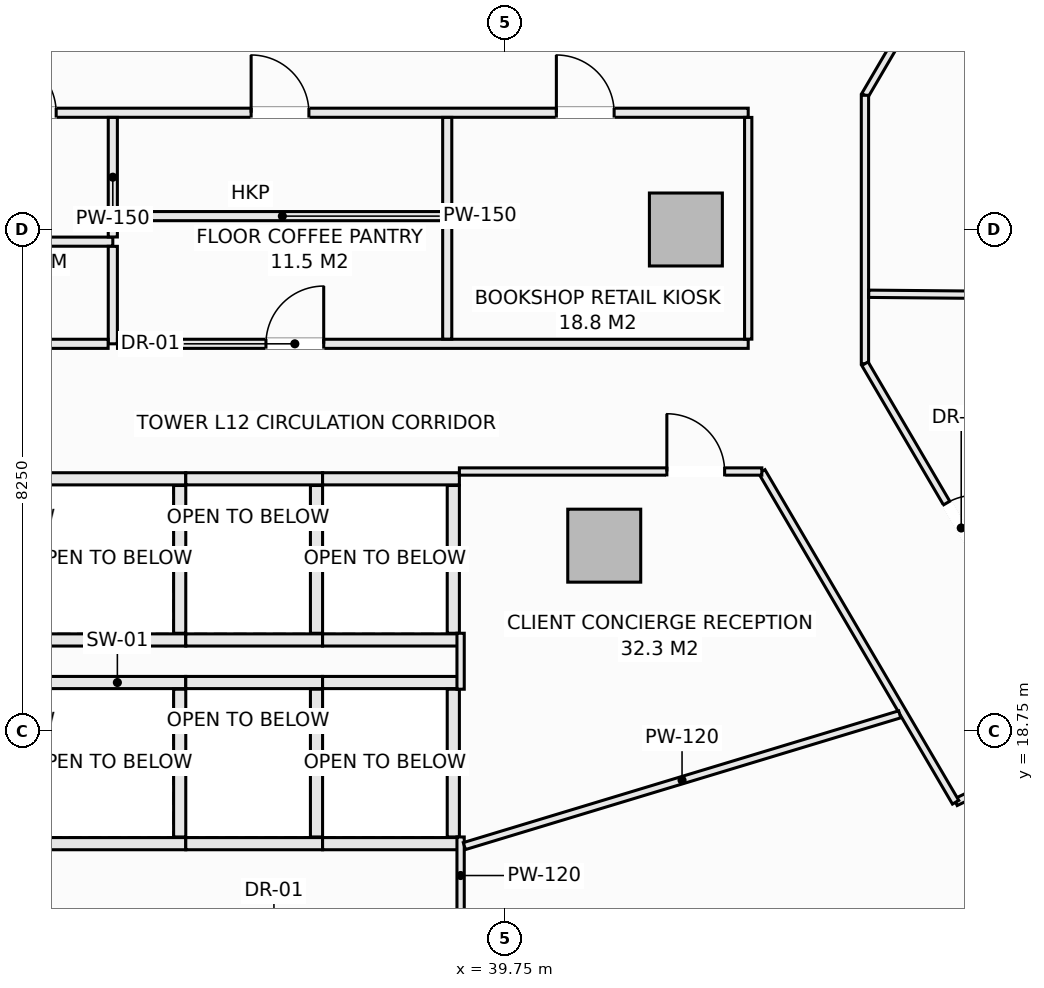
"""IFC4 building model, lengths in metres.
Left out: names, types, materials, properties, quantities, classifications, styles, units other than length and angle.
Written with IfcOpenShell. Run it as: python <this file> out.ifc"""

import sys

from ifc_helpers import new_model, si_unit, direction, frame, frame_2d, origin, origin_2d, place, context, subcontext, project, spatial, rectangle, extrude, element, fill, save


model = new_model("IFC4")
c1 = context("Model", 3, precision=1e-05, world=origin(), true_north=direction((0.0, 1.0)))
c2 = subcontext(c1, "Body", "Model", "MODEL_VIEW")
j1 = project(units=[si_unit("LENGTHUNIT", "METRE"), si_unit("PLANEANGLEUNIT", "RADIAN")], contexts=[c1])
p1 = place(None, origin())
s1 = spatial("IfcSite", under=j1, at=p1, CompositionType="ELEMENT")
p2 = place(p1, origin())
s2 = spatial("IfcBuilding", under=s1, at=p2, CompositionType="ELEMENT")
p3 = place(p2, frame((0.0, 0.0, 53.45)))
s3 = spatial("IfcBuildingStorey", under=s2, at=p3, CompositionType="ELEMENT", Elevation=53.45)
for number, where, z_axis, x_axis in (
    (1, (42.725, 27.0, -0.28), (0.0, 0.0, 1.0), (1.0, 0.0, 0.0)),
    (2, (41.382, 21.801, -0.28), (0.0, 0.0, 1.0), (1.0, 0.0, 0.0)),
):
    element("IfcColumn", number, at=place(p3, frame(where, z_axis=z_axis, x_axis=x_axis)), inside=s3, PredefinedType="COLUMN", context=c2, shape_type="SweptSolid", body=[
        extrude(rectangle(XDim=1.2, YDim=1.2, at=origin_2d()), origin(), (0.0, 0.0, 1.0), 3.85),
    ])
p4 = place(p3, frame((47.224, 13.64, 0.0), z_axis=(0.0, 0.0, 1.0), x_axis=(0.901354747727, 0.433081538224, 0.0)))
e3 = element("IfcWall", 3, at=p4, inside=s3, PredefinedType="SOLIDWALL", context=c2, shape_type="SweptSolid", body=[
    extrude(rectangle(XDim=6.431, YDim=0.3, at=frame_2d((3.215, 0.0))), origin(), (0.0, 0.0, 1.0), 3.093),
])
p5 = place(p4, frame((2.015, 0.0, 0.85)))
e4 = element("IfcOpeningElement", 4, at=p5, cuts=e3, PredefinedType="OPENING", context=c2, shape_type="SweptSolid", body=[
    extrude(rectangle(XDim=2.4, YDim=1.9, at=frame_2d((1.2, 0.95))), frame((0.0, 0.16, 0.0), z_axis=(0.0, -1.0, 0.0), x_axis=(1.0, 0.0, 0.0)), (0.0, 0.0, 1.0), 0.32),
])
for number, where, z_axis, x_axis in (
    (5, (32.25, 19.55, 0.0), (0.0, 0.0, 1.0), (1.0, 0.0, 0.0)),
    (6, (32.25, 16.9, 0.0), (0.0, 0.0, 1.0), (1.0, 0.0, 0.0)),
):
    element("IfcWall", number, at=place(p3, frame(where, z_axis=z_axis, x_axis=x_axis)), inside=s3, PredefinedType="SOLIDWALL", context=c2, shape_type="SweptSolid", body=[
        extrude(rectangle(XDim=2.25, YDim=0.2, at=frame_2d((1.125, 0.0))), origin(), (0.0, 0.0, 1.0), 3.57),
    ])
p6 = place(p3, frame((34.4, 17.01, 0.0), z_axis=(0.0, 0.0, 1.0), x_axis=(0.0, 1.0, 0.0)))
e7 = element("IfcWall", 7, at=p6, inside=s3, PredefinedType="SOLIDWALL", context=c2, shape_type="SweptSolid", body=[
    extrude(rectangle(XDim=2.43, YDim=0.2, at=frame_2d((1.215, 0.0))), origin(), (0.0, 0.0, 1.0), 3.57),
])
for number, where, z_axis, x_axis in (
    (8, (34.5, 19.55, 0.0), (0.0, 0.0, 1.0), (1.0, 0.0, 0.0)),
    (9, (34.5, 16.9, 0.0), (0.0, 0.0, 1.0), (1.0, 0.0, 0.0)),
):
    element("IfcWall", number, at=place(p3, frame(where, z_axis=z_axis, x_axis=x_axis)), inside=s3, PredefinedType="SOLIDWALL", context=c2, shape_type="SweptSolid", body=[
        extrude(rectangle(XDim=2.25, YDim=0.2, at=frame_2d((1.125, 0.0))), origin(), (0.0, 0.0, 1.0), 3.57),
    ])
p7 = place(p3, frame((36.65, 17.01, 0.0), z_axis=(0.0, 0.0, 1.0), x_axis=(0.0, 1.0, 0.0)))
e10 = element("IfcWall", 10, at=p7, inside=s3, PredefinedType="SOLIDWALL", context=c2, shape_type="SweptSolid", body=[
    extrude(rectangle(XDim=2.43, YDim=0.2, at=frame_2d((1.215, 0.0))), origin(), (0.0, 0.0, 1.0), 3.57),
])
for number, where, z_axis, x_axis in (
    (11, (36.75, 19.55, 0.0), (0.0, 0.0, 1.0), (1.0, 0.0, 0.0)),
    (12, (36.75, 16.9, 0.0), (0.0, 0.0, 1.0), (1.0, 0.0, 0.0)),
):
    element("IfcWall", number, at=place(p3, frame(where, z_axis=z_axis, x_axis=x_axis)), inside=s3, PredefinedType="SOLIDWALL", context=c2, shape_type="SweptSolid", body=[
        extrude(rectangle(XDim=2.25, YDim=0.2, at=frame_2d((1.125, 0.0))), origin(), (0.0, 0.0, 1.0), 3.57),
    ])
p8 = place(p3, frame((38.9, 17.01, 0.0), z_axis=(0.0, 0.0, 1.0), x_axis=(0.0, 1.0, 0.0)))
e13 = element("IfcWall", 13, at=p8, inside=s3, PredefinedType="SOLIDWALL", context=c2, shape_type="SweptSolid", body=[
    extrude(rectangle(XDim=2.43, YDim=0.2, at=frame_2d((1.215, 0.0))), origin(), (0.0, 0.0, 1.0), 3.57),
])
for number, where, z_axis, x_axis in (
    (14, (32.25, 22.9, 0.0), (0.0, 0.0, 1.0), (1.0, 0.0, 0.0)),
    (15, (32.25, 20.25, 0.0), (0.0, 0.0, 1.0), (1.0, 0.0, 0.0)),
):
    element("IfcWall", number, at=place(p3, frame(where, z_axis=z_axis, x_axis=x_axis)), inside=s3, PredefinedType="SOLIDWALL", context=c2, shape_type="SweptSolid", body=[
        extrude(rectangle(XDim=2.25, YDim=0.2, at=frame_2d((1.125, 0.0))), origin(), (0.0, 0.0, 1.0), 3.57),
    ])
p9 = place(p3, frame((34.4, 20.36, 0.0), z_axis=(0.0, 0.0, 1.0), x_axis=(0.0, 1.0, 0.0)))
e16 = element("IfcWall", 16, at=p9, inside=s3, PredefinedType="SOLIDWALL", context=c2, shape_type="SweptSolid", body=[
    extrude(rectangle(XDim=2.43, YDim=0.2, at=frame_2d((1.215, 0.0))), origin(), (0.0, 0.0, 1.0), 3.57),
])
for number, where, z_axis, x_axis in (
    (17, (34.5, 22.9, 0.0), (0.0, 0.0, 1.0), (1.0, 0.0, 0.0)),
    (18, (34.5, 20.25, 0.0), (0.0, 0.0, 1.0), (1.0, 0.0, 0.0)),
):
    element("IfcWall", number, at=place(p3, frame(where, z_axis=z_axis, x_axis=x_axis)), inside=s3, PredefinedType="SOLIDWALL", context=c2, shape_type="SweptSolid", body=[
        extrude(rectangle(XDim=2.25, YDim=0.2, at=frame_2d((1.125, 0.0))), origin(), (0.0, 0.0, 1.0), 3.57),
    ])
p10 = place(p3, frame((36.65, 20.36, 0.0), z_axis=(0.0, 0.0, 1.0), x_axis=(0.0, 1.0, 0.0)))
e19 = element("IfcWall", 19, at=p10, inside=s3, PredefinedType="SOLIDWALL", context=c2, shape_type="SweptSolid", body=[
    extrude(rectangle(XDim=2.43, YDim=0.2, at=frame_2d((1.215, 0.0))), origin(), (0.0, 0.0, 1.0), 3.57),
])
for number, where, z_axis, x_axis in (
    (20, (36.75, 22.9, 0.0), (0.0, 0.0, 1.0), (1.0, 0.0, 0.0)),
    (21, (36.75, 20.25, 0.0), (0.0, 0.0, 1.0), (1.0, 0.0, 0.0)),
):
    element("IfcWall", number, at=place(p3, frame(where, z_axis=z_axis, x_axis=x_axis)), inside=s3, PredefinedType="SOLIDWALL", context=c2, shape_type="SweptSolid", body=[
        extrude(rectangle(XDim=2.25, YDim=0.2, at=frame_2d((1.125, 0.0))), origin(), (0.0, 0.0, 1.0), 3.57),
    ])
p11 = place(p3, frame((38.9, 20.36, 0.0), z_axis=(0.0, 0.0, 1.0), x_axis=(0.0, 1.0, 0.0)))
e22 = element("IfcWall", 22, at=p11, inside=s3, PredefinedType="SOLIDWALL", context=c2, shape_type="SweptSolid", body=[
    extrude(rectangle(XDim=2.43, YDim=0.2, at=frame_2d((1.215, 0.0))), origin(), (0.0, 0.0, 1.0), 3.57),
])
p12 = place(p3, frame((30.0, 26.8, 0.0), z_axis=(0.0, 0.0, 1.0), x_axis=(1.0, 0.0, 0.0)))
e23 = element("IfcWall", 23, at=p12, inside=s3, PredefinedType="PARTITIONING", context=c2, shape_type="SweptSolid", body=[
    extrude(rectangle(XDim=3.3, YDim=0.15, at=frame_2d((1.65, 0.0))), origin(), (0.0, 0.0, 1.0), 3.57),
])
p13 = place(p3, frame((30.077, 28.92, 0.0), z_axis=(0.0, 0.0, 1.0), x_axis=(1.0, 0.0, 0.0)))
e24 = element("IfcWall", 24, at=p13, inside=s3, PredefinedType="PARTITIONING", context=c2, shape_type="SweptSolid", body=[
    extrude(rectangle(XDim=13.673, YDim=0.15, at=frame_2d((6.836, 0.0))), origin(), (0.0, 0.0, 1.0), 3.57),
])
p14 = place(p13, frame((1.342, 0.0, 0.0)))
e25 = element("IfcOpeningElement", 25, at=p14, cuts=e24, PredefinedType="OPENING", context=c2, shape_type="SweptSolid", body=[
    extrude(rectangle(XDim=0.95, YDim=2.1, at=frame_2d((0.475, 1.05))), frame((0.0, 0.085, 0.0), z_axis=(0.0, -1.0, 0.0), x_axis=(1.0, 0.0, 0.0)), (0.0, 0.0, 1.0), 0.17),
])
p15 = place(p13, frame((5.498, 0.0, 0.0)))
e26 = element("IfcOpeningElement", 26, at=p15, cuts=e24, PredefinedType="OPENING", context=c2, shape_type="SweptSolid", body=[
    extrude(rectangle(XDim=0.95, YDim=2.1, at=frame_2d((0.475, 1.05))), frame((0.0, 0.085, 0.0), z_axis=(0.0, -1.0, 0.0), x_axis=(1.0, 0.0, 0.0)), (0.0, 0.0, 1.0), 0.17),
])
p16 = place(p13, frame((10.518, 0.0, 0.0)))
e27 = element("IfcOpeningElement", 27, at=p16, cuts=e24, PredefinedType="OPENING", context=c2, shape_type="SweptSolid", body=[
    extrude(rectangle(XDim=0.95, YDim=2.1, at=frame_2d((0.475, 1.05))), frame((0.0, 0.085, 0.0), z_axis=(0.0, -1.0, 0.0), x_axis=(1.0, 0.0, 0.0)), (0.0, 0.0, 1.0), 0.17),
])
p17 = place(p3, frame((33.3, 25.12, 0.0), z_axis=(0.0, 0.0, 1.0), x_axis=(0.0, 1.0, 0.0)))
e28 = element("IfcWall", 28, at=p17, inside=s3, PredefinedType="PARTITIONING", context=c2, shape_type="SweptSolid", body=[
    extrude(rectangle(XDim=1.603, YDim=0.15, at=frame_2d((0.801, 0.0))), origin(), (0.0, 0.0, 1.0), 3.57),
])
p18 = place(p3, frame((33.3, 26.877, 0.0), z_axis=(0.0, 0.0, 1.0), x_axis=(0.0, 1.0, 0.0)))
e29 = element("IfcWall", 29, at=p18, inside=s3, PredefinedType="PARTITIONING", context=c2, shape_type="SweptSolid", body=[
    extrude(rectangle(XDim=1.966, YDim=0.15, at=frame_2d((0.983, 0.0))), origin(), (0.0, 0.0, 1.0), 3.57),
])
p19 = place(p3, frame((30.077, 25.12, 0.0), z_axis=(0.0, 0.0, 1.0), x_axis=(1.0, 0.0, 0.0)))
e30 = element("IfcWall", 30, at=p19, inside=s3, PredefinedType="PARTITIONING", context=c2, shape_type="SweptSolid", body=[
    extrude(rectangle(XDim=3.146, YDim=0.15, at=frame_2d((1.573, 0.0))), origin(), (0.0, 0.0, 1.0), 3.57),
])
p20 = place(p19, frame((1.098, 0.0, 0.0)))
e31 = element("IfcOpeningElement", 31, at=p20, cuts=e30, PredefinedType="OPENING", context=c2, shape_type="SweptSolid", body=[
    extrude(rectangle(XDim=0.95, YDim=2.1, at=frame_2d((0.475, 1.05))), frame((0.0, 0.085, 0.0), z_axis=(0.0, -1.0, 0.0), x_axis=(1.0, 0.0, 0.0)), (0.0, 0.0, 1.0), 0.17),
])
p21 = place(p3, frame((33.377, 25.12, 0.0), z_axis=(0.0, 0.0, 1.0), x_axis=(1.0, 0.0, 0.0)))
e32 = element("IfcWall", 32, at=p21, inside=s3, PredefinedType="PARTITIONING", context=c2, shape_type="SweptSolid", body=[
    extrude(rectangle(XDim=10.373, YDim=0.15, at=frame_2d((5.187, 0.0))), origin(), (0.0, 0.0, 1.0), 3.57),
])
p22 = place(p21, frame((2.441, 0.0, 0.0)))
e33 = element("IfcOpeningElement", 33, at=p22, cuts=e32, PredefinedType="OPENING", context=c2, shape_type="SweptSolid", body=[
    extrude(rectangle(XDim=0.95, YDim=2.1, at=frame_2d((0.475, 1.05))), frame((0.0, 0.085, 0.0), z_axis=(0.0, -1.0, 0.0), x_axis=(1.0, 0.0, 0.0)), (0.0, 0.0, 1.0), 0.17),
])
p23 = place(p3, frame((33.377, 27.22, 0.0), z_axis=(0.0, 0.0, 1.0), x_axis=(1.0, 0.0, 0.0)))
e34 = element("IfcWall", 34, at=p23, inside=s3, PredefinedType="PARTITIONING", context=c2, shape_type="SweptSolid", body=[
    extrude(rectangle(XDim=5.423, YDim=0.15, at=frame_2d((2.711, 0.0))), origin(), (0.0, 0.0, 1.0), 3.57),
])
p24 = place(p3, frame((38.8, 25.197, 0.0), z_axis=(0.0, 0.0, 1.0), x_axis=(0.0, 1.0, 0.0)))
e35 = element("IfcWall", 35, at=p24, inside=s3, PredefinedType="PARTITIONING", context=c2, shape_type="SweptSolid", body=[
    extrude(rectangle(XDim=1.946, YDim=0.15, at=frame_2d((0.973, 0.0))), origin(), (0.0, 0.0, 1.0), 3.57),
])
p25 = place(p3, frame((38.8, 27.297, 0.0), z_axis=(0.0, 0.0, 1.0), x_axis=(0.0, 1.0, 0.0)))
e36 = element("IfcWall", 36, at=p25, inside=s3, PredefinedType="PARTITIONING", context=c2, shape_type="SweptSolid", body=[
    extrude(rectangle(XDim=1.546, YDim=0.15, at=frame_2d((0.773, 0.0))), origin(), (0.0, 0.0, 1.0), 3.57),
])
p26 = place(p3, frame((45.67, 29.207, 0.0), z_axis=(0.0, 0.0, 1.0), x_axis=(0.505582857323, 0.86277805627, 0.0)))
e37 = element("IfcWall", 37, at=p26, inside=s3, PredefinedType="PARTITIONING", context=c2, shape_type="SweptSolid", body=[
    extrude(rectangle(XDim=7.108, YDim=0.12, at=frame_2d((3.554, 0.0))), origin(), (0.0, 0.0, 1.0), 3.57),
])
p27 = place(p26, frame((4.0, 0.0, 0.0)))
e38 = element("IfcOpeningElement", 38, at=p27, cuts=e37, PredefinedType="OPENING", context=c2, shape_type="SweptSolid", body=[
    extrude(rectangle(XDim=0.95, YDim=2.1, at=frame_2d((0.475, 1.05))), frame((0.0, 0.07, 0.0), z_axis=(0.0, -1.0, 0.0), x_axis=(1.0, 0.0, 0.0)), (0.0, 0.0, 1.0), 0.14),
])
p28 = place(p3, frame((45.67, 24.793, 0.0), z_axis=(0.0, 0.0, 1.0), x_axis=(0.0, 1.0, 0.0)))
e39 = element("IfcWall", 39, at=p28, inside=s3, PredefinedType="PARTITIONING", context=c2, shape_type="SweptSolid", body=[
    extrude(rectangle(XDim=4.414, YDim=0.12, at=frame_2d((2.207, 0.0))), origin(), (0.0, 0.0, 1.0), 3.57),
])
p29 = place(p3, frame((45.67, 24.793, 0.0), z_axis=(0.0, 0.0, 1.0), x_axis=(0.505584917928, -0.862776848764, 0.0)))
e40 = element("IfcWall", 40, at=p29, inside=s3, PredefinedType="PARTITIONING", context=c2, shape_type="SweptSolid", body=[
    extrude(rectangle(XDim=7.17, YDim=0.12, at=frame_2d((3.585, 0.0))), origin(), (0.0, 0.0, 1.0), 3.57),
])
p30 = place(p29, frame((2.656, 0.0, 0.0)))
e41 = element("IfcOpeningElement", 41, at=p30, cuts=e40, PredefinedType="OPENING", context=c2, shape_type="SweptSolid", body=[
    extrude(rectangle(XDim=0.95, YDim=2.1, at=frame_2d((0.475, 1.05))), frame((0.0, 0.07, 0.0), z_axis=(0.0, -1.0, 0.0), x_axis=(1.0, 0.0, 0.0)), (0.0, 0.0, 1.0), 0.14),
])
p31 = place(p3, frame((47.161, 17.581, 0.0), z_axis=(0.0, 0.0, 1.0), x_axis=(0.901265146481, 0.433267972204, 0.0)))
e42 = element("IfcWall", 42, at=p31, inside=s3, PredefinedType="PARTITIONING", context=c2, shape_type="SweptSolid", body=[
    extrude(rectangle(XDim=2.306, YDim=0.12, at=frame_2d((1.153, 0.0))), origin(), (0.0, 0.0, 1.0), 3.57),
])
p32 = place(p3, frame((43.974, 23.02, 0.0), z_axis=(0.0, 0.0, 1.0), x_axis=(0.505531634194, -0.862808070679, 0.0)))
e43 = element("IfcWall", 43, at=p32, inside=s3, PredefinedType="PARTITIONING", context=c2, shape_type="SweptSolid", body=[
    extrude(rectangle(XDim=6.304, YDim=0.12, at=frame_2d((3.152, 0.0))), origin(), (0.0, 0.0, 1.0), 3.205),
])
p33 = place(p3, frame((39.0, 23.02, 0.0), z_axis=(0.0, 0.0, 1.0), x_axis=(1.0, 0.0, 0.0)))
e44 = element("IfcWall", 44, at=p33, inside=s3, PredefinedType="PARTITIONING", context=c2, shape_type="SweptSolid", body=[
    extrude(rectangle(XDim=4.974, YDim=0.12, at=frame_2d((2.487, 0.0))), origin(), (0.0, 0.0, 1.0), 3.57),
])
p34 = place(p33, frame((3.412, 0.0, 0.0)))
e45 = element("IfcOpeningElement", 45, at=p34, cuts=e44, PredefinedType="OPENING", context=c2, shape_type="SweptSolid", body=[
    extrude(rectangle(XDim=0.95, YDim=2.1, at=frame_2d((0.475, 1.05))), frame((0.0, 0.07, 0.0), z_axis=(0.0, -1.0, 0.0), x_axis=(1.0, 0.0, 0.0)), (0.0, 0.0, 1.0), 0.14),
])
p35 = place(p3, frame((39.02, 15.742, 0.0), z_axis=(0.0, 0.0, 1.0), x_axis=(0.0, 1.0, 0.0)))
e46 = element("IfcWall", 46, at=p35, inside=s3, PredefinedType="PARTITIONING", context=c2, shape_type="SweptSolid", body=[
    extrude(rectangle(XDim=1.268, YDim=0.12, at=frame_2d((0.634, 0.0))), origin(), (0.0, 0.0, 1.0), 2.934),
])
p36 = place(p3, frame((39.02, 19.44, 0.0), z_axis=(0.0, 0.0, 1.0), x_axis=(0.0, 1.0, 0.0)))
e47 = element("IfcWall", 47, at=p36, inside=s3, PredefinedType="PARTITIONING", context=c2, shape_type="SweptSolid", body=[
    extrude(rectangle(XDim=0.92, YDim=0.12, at=frame_2d((0.46, 0.0))), origin(), (0.0, 0.0, 1.0), 3.57),
])
p37 = place(p3, frame((43.75, 25.197, 0.0), z_axis=(0.0, 0.0, 1.0), x_axis=(0.0, 1.0, 0.0)))
e48 = element("IfcWall", 48, at=p37, inside=s3, PredefinedType="PARTITIONING", context=c2, shape_type="SweptSolid", body=[
    extrude(rectangle(XDim=3.646, YDim=0.12, at=frame_2d((1.823, 0.0))), origin(), (0.0, 0.0, 1.0), 3.57),
])
p38 = place(p3, frame((45.732, 25.943, 0.0), z_axis=(0.0, 0.0, 1.0), x_axis=(0.999960667943, -0.008869192068, 0.0)))
e49 = element("IfcWall", 49, at=p38, inside=s3, PredefinedType="PARTITIONING", context=c2, shape_type="SweptSolid", body=[
    extrude(rectangle(XDim=10.488, YDim=0.12, at=frame_2d((5.244, 0.0))), origin(), (0.0, 0.0, 1.0), 3.57),
])
p39 = place(p3, frame((39.082, 16.86, 0.0), z_axis=(0.0, 0.0, 1.0), x_axis=(0.957120973048, 0.289688527476, 0.0)))
e50 = element("IfcWall", 50, at=p39, inside=s3, PredefinedType="PARTITIONING", context=c2, shape_type="SweptSolid", body=[
    extrude(rectangle(XDim=7.48, YDim=0.12, at=frame_2d((3.74, 0.0))), origin(), (0.0, 0.0, 1.0), 3.57),
])
p40 = place(p3, frame((36.012, 13.472, 0.0), z_axis=(0.0, 0.0, 1.0), x_axis=(0.983545247648, 0.180661965641, 0.0)))
e51 = element("IfcWall", 51, at=p40, inside=s3, PredefinedType="PARTITIONING", context=c2, shape_type="SweptSolid", body=[
    extrude(rectangle(XDim=17.073, YDim=0.12, at=frame_2d((8.537, 0.0))), origin(), (0.0, 0.0, 1.0), 3.093),
])
p41 = place(p3, frame((46.939, 30.933, 0.0), z_axis=(0.0, 0.0, 1.0), x_axis=(0.668545536635, -0.743671207891, 0.0)))
e52 = element("IfcWall", 52, at=p41, inside=s3, PredefinedType="PARTITIONING", context=c2, shape_type="SweptSolid", body=[
    extrude(rectangle(XDim=6.695, YDim=0.12, at=frame_2d((3.347, 0.0))), origin(), (0.0, 0.0, 1.0), 3.57),
])
p42 = place(p14, origin())
e53 = element("IfcDoor", 53, at=p42, inside=s3, OperationType="SINGLE_SWING_LEFT", PredefinedType="DOOR", context=c2, shape_type="SweptSolid", body=[
    extrude(rectangle(XDim=0.95, YDim=2.1, at=frame_2d((0.475, 1.05))), frame((0.0, 0.025, 0.0), z_axis=(0.0, -1.0, 0.0), x_axis=(1.0, 0.0, 0.0)), (0.0, 0.0, 1.0), 0.05),
])
fill(e25, e53)
p43 = place(p15, origin())
e54 = element("IfcDoor", 54, at=p43, inside=s3, OperationType="SINGLE_SWING_LEFT", PredefinedType="DOOR", context=c2, shape_type="SweptSolid", body=[
    extrude(rectangle(XDim=0.95, YDim=2.1, at=frame_2d((0.475, 1.05))), frame((0.0, 0.025, 0.0), z_axis=(0.0, -1.0, 0.0), x_axis=(1.0, 0.0, 0.0)), (0.0, 0.0, 1.0), 0.05),
])
fill(e26, e54)
p44 = place(p22, origin())
e55 = element("IfcDoor", 55, at=p44, inside=s3, OperationType="SINGLE_SWING_RIGHT", PredefinedType="DOOR", context=c2, shape_type="SweptSolid", body=[
    extrude(rectangle(XDim=0.95, YDim=2.1, at=frame_2d((0.475, 1.05))), frame((0.0, 0.025, 0.0), z_axis=(0.0, -1.0, 0.0), x_axis=(1.0, 0.0, 0.0)), (0.0, 0.0, 1.0), 0.05),
])
fill(e33, e55)
p45 = place(p34, origin())
e56 = element("IfcDoor", 56, at=p45, inside=s3, OperationType="SINGLE_SWING_LEFT", PredefinedType="DOOR", context=c2, shape_type="SweptSolid", body=[
    extrude(rectangle(XDim=0.95, YDim=2.1, at=frame_2d((0.475, 1.05))), frame((0.0, 0.025, 0.0), z_axis=(0.0, -1.0, 0.0), x_axis=(1.0, 0.0, 0.0)), (0.0, 0.0, 1.0), 0.05),
])
fill(e45, e56)
p46 = place(p30, origin())
e57 = element("IfcDoor", 57, at=p46, inside=s3, OperationType="SINGLE_SWING_RIGHT", PredefinedType="DOOR", context=c2, shape_type="SweptSolid", body=[
    extrude(rectangle(XDim=0.95, YDim=2.1, at=frame_2d((0.475, 1.05))), frame((0.0, 0.025, 0.0), z_axis=(0.0, -1.0, 0.0), x_axis=(1.0, 0.0, 0.0)), (0.0, 0.0, 1.0), 0.05),
])
fill(e41, e57)
p47 = place(p16, origin())
e58 = element("IfcDoor", 58, at=p47, inside=s3, OperationType="SINGLE_SWING_LEFT", PredefinedType="DOOR", context=c2, shape_type="SweptSolid", body=[
    extrude(rectangle(XDim=0.95, YDim=2.1, at=frame_2d((0.475, 1.05))), frame((0.0, 0.025, 0.0), z_axis=(0.0, -1.0, 0.0), x_axis=(1.0, 0.0, 0.0)), (0.0, 0.0, 1.0), 0.05),
])
fill(e27, e58)
save(model, sys.argv[1])
